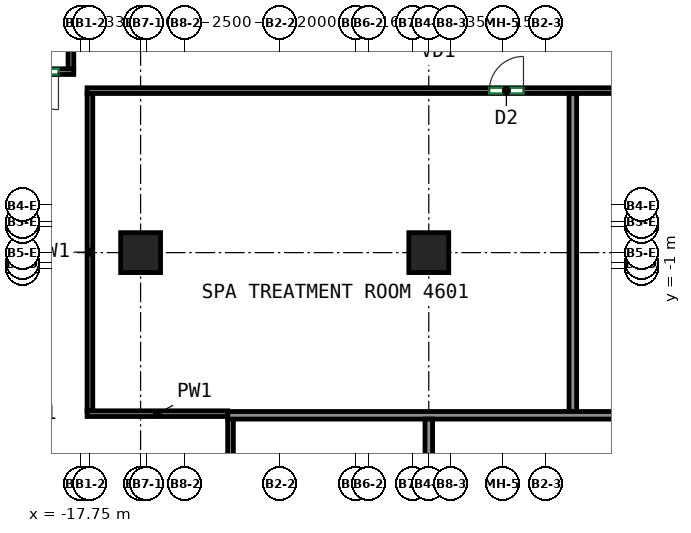
"""IFC4 building model, lengths in metres.
Left out: names, types, materials, properties, quantities, classifications, styles, units other than length and angle.
Written with IfcOpenShell. Run it as: python <this file> out.ifc"""

import sys

from ifc_helpers import new_model, si_unit, direction, frame, frame_2d, origin, origin_2d, place, context, subcontext, project, spatial, rectangle, extrude, source, transform, mapped, element, fill, save


model = new_model("IFC4")
c1 = context("Model", 3, precision=1e-05, world=origin(), true_north=direction((0.0, 1.0)))
c2 = subcontext(c1, "Body", "Model", "MODEL_VIEW")
j1 = project(units=[si_unit("LENGTHUNIT", "METRE"), si_unit("PLANEANGLEUNIT", "RADIAN")], contexts=[c1])
p1 = place(None, origin())
s1 = spatial("IfcSite", under=j1, at=p1, CompositionType="ELEMENT")
p2 = place(p1, origin())
s2 = spatial("IfcBuilding", under=s1, at=p2, CompositionType="ELEMENT")
p3 = place(p2, frame((0.0, 0.0, 192.3)))
s3 = spatial("IfcBuildingStorey", under=s2, at=p3, CompositionType="ELEMENT", Elevation=192.3)
m1 = source(origin(), c2, "Body", "SweptSolid", [
    extrude(rectangle(XDim=1.05, YDim=1.05, at=origin_2d()), origin(), (0.0, 0.0, 1.0), 3.0),
])
for number, where, z_axis, x_axis in (
    (1, (-16.167, -0.562, 0.0), (0.0, 0.0, 1.0), (1.0, 0.0, 0.0)),
    (2, (-8.583, -0.562, 0.0), (0.0, 0.0, 1.0), (1.0, 0.0, 0.0)),
):
    element("IfcColumn", number, at=place(p3, frame(where, z_axis=z_axis, x_axis=x_axis)), inside=s3, PredefinedType="COLUMN", context=c2, shape_type="MappedRepresentation", body=[
        mapped(m1, transform((0.0, 0.0, 0.0))),
    ])
p4 = place(p3, frame((-17.925, 4.2, 0.0), z_axis=(0.0, 0.0, 1.0), x_axis=(-1.0, 0.0, 0.0)))
e3 = element("IfcWall", 3, at=p4, inside=s3, PredefinedType="PARTITIONING", context=c2, shape_type="SweptSolid", body=[
    extrude(rectangle(XDim=2.109, YDim=0.15, at=frame_2d((1.054, 0.0))), origin(), (0.0, 0.0, 1.0), 3.0),
])
p5 = place(p4, frame((0.403, 0.0, 0.0)))
e4 = element("IfcOpeningElement", 4, at=p5, cuts=e3, PredefinedType="OPENING", context=c2, shape_type="SweptSolid", body=[
    extrude(rectangle(XDim=1.0, YDim=2.1, at=frame_2d((0.5, 1.05))), frame((0.0, 0.085, 0.0), z_axis=(0.0, -1.0, 0.0), x_axis=(1.0, 0.0, 0.0)), (0.0, 0.0, 1.0), 0.17),
])
p6 = place(p3, frame((-18.0, 4.275, 0.0), z_axis=(0.0, 0.0, 1.0), x_axis=(0.0, 1.0, 0.0)))
e5 = element("IfcWall", 5, at=p6, inside=s3, PredefinedType="PARTITIONING", context=c2, shape_type="SweptSolid", body=[
    extrude(rectangle(XDim=1.285, YDim=0.15, at=frame_2d((0.643, 0.0))), origin(), (0.0, 0.0, 1.0), 3.0),
])
p7 = place(p3, frame((-17.575, 3.7, 0.0), z_axis=(0.0, 0.0, 1.0), x_axis=(1.0, 0.0, 0.0)))
e6 = element("IfcWall", 6, at=p7, inside=s3, PredefinedType="PARTITIONING", context=c2, shape_type="SweptSolid", body=[
    extrude(rectangle(XDim=33.85, YDim=0.15, at=frame_2d((16.925, 0.0))), origin(), (0.0, 0.0, 1.0), 3.0),
])
p8 = place(p7, frame((10.584, 0.0, 0.0)))
e7 = element("IfcOpeningElement", 7, at=p8, cuts=e6, PredefinedType="OPENING", context=c2, shape_type="SweptSolid", body=[
    extrude(rectangle(XDim=0.9, YDim=2.1, at=frame_2d((0.45, 1.05))), frame((0.0, 0.085, 0.0), z_axis=(0.0, -1.0, 0.0), x_axis=(1.0, 0.0, 0.0)), (0.0, 0.0, 1.0), 0.17),
])
p9 = place(p7, frame((16.175, 0.0, 0.0)))
e8 = element("IfcOpeningElement", 8, at=p9, cuts=e6, PredefinedType="OPENING", context=c2, shape_type="SweptSolid", body=[
    extrude(rectangle(XDim=0.9, YDim=2.1, at=frame_2d((0.45, 1.05))), frame((0.0, 0.085, 0.0), z_axis=(0.0, -1.0, 0.0), x_axis=(1.0, 0.0, 0.0)), (0.0, 0.0, 1.0), 0.17),
])
p10 = place(p7, frame((25.696, 0.0, 0.0)))
e9 = element("IfcOpeningElement", 9, at=p10, cuts=e6, PredefinedType="OPENING", context=c2, shape_type="SweptSolid", body=[
    extrude(rectangle(XDim=0.9, YDim=2.1, at=frame_2d((0.45, 1.05))), frame((0.0, 0.085, 0.0), z_axis=(0.0, -1.0, 0.0), x_axis=(1.0, 0.0, 0.0)), (0.0, 0.0, 1.0), 0.17),
])
p11 = place(p3, frame((-17.5, -4.725, 0.0), z_axis=(0.0, 0.0, 1.0), x_axis=(0.0, 1.0, 0.0)))
e10 = element("IfcWall", 10, at=p11, inside=s3, PredefinedType="PARTITIONING", context=c2, shape_type="SweptSolid", body=[
    extrude(rectangle(XDim=8.35, YDim=0.15, at=frame_2d((4.175, 0.0))), origin(), (0.0, 0.0, 1.0), 3.0),
])
p12 = place(p3, frame((-17.575, -4.8, 0.0), z_axis=(0.0, 0.0, 1.0), x_axis=(1.0, 0.0, 0.0)))
e11 = element("IfcWall", 11, at=p12, inside=s3, PredefinedType="PARTITIONING", context=c2, shape_type="SweptSolid", body=[
    extrude(rectangle(XDim=3.702, YDim=0.15, at=frame_2d((1.851, 0.0))), origin(), (0.0, 0.0, 1.0), 3.0),
])
p13 = place(p3, frame((-13.8, -7.75, 0.0), z_axis=(0.0, 0.0, 1.0), x_axis=(0.0, 1.0, 0.0)))
e12 = element("IfcWall", 12, at=p13, inside=s3, PredefinedType="PARTITIONING", context=c2, shape_type="SweptSolid", body=[
    extrude(rectangle(XDim=2.817, YDim=0.15, at=frame_2d((1.408, 0.0))), origin(), (0.0, 0.0, 1.0), 3.0),
])
p14 = place(p3, frame((-4.792, -4.743, 0.0), z_axis=(0.0, 0.0, 1.0), x_axis=(0.0, 1.0, 0.0)))
e13 = element("IfcWall", 13, at=p14, inside=s3, PredefinedType="PARTITIONING", context=c2, shape_type="SweptSolid", body=[
    extrude(rectangle(XDim=8.366, YDim=0.2, at=frame_2d((4.183, 0.0))), origin(), (0.0, 0.0, 1.0), 3.0),
])
p15 = place(p3, frame((-13.873, -4.843, 0.0), z_axis=(0.0, 0.0, 1.0), x_axis=(1.0, 0.0, 0.0)))
e14 = element("IfcWall", 14, at=p15, inside=s3, PredefinedType="PARTITIONING", context=c2, shape_type="SweptSolid", body=[
    extrude(rectangle(XDim=30.146, YDim=0.2, at=frame_2d((15.073, 0.0))), origin(), (0.0, 0.0, 1.0), 3.0),
])
p16 = place(p3, frame((-8.583, -8.6, 0.0), z_axis=(0.0, 0.0, 1.0), x_axis=(0.0, 1.0, 0.0)))
e15 = element("IfcWall", 15, at=p16, inside=s3, PredefinedType="PARTITIONING", context=c2, shape_type="SweptSolid", body=[
    extrude(rectangle(XDim=3.657, YDim=0.2, at=frame_2d((1.829, 0.0))), origin(), (0.0, 0.0, 1.0), 2.4),
])
p17 = place(p8, origin())
e16 = element("IfcDoor", 16, at=p17, inside=s3, OperationType="SINGLE_SWING_RIGHT", PredefinedType="DOOR", context=c2, shape_type="SweptSolid", body=[
    extrude(rectangle(XDim=0.9, YDim=2.1, at=frame_2d((0.45, 1.05))), frame((0.0, 0.025, 0.0), z_axis=(0.0, -1.0, 0.0), x_axis=(1.0, 0.0, 0.0)), (0.0, 0.0, 1.0), 0.05),
])
fill(e7, e16)
p18 = place(p5, origin())
e17 = element("IfcDoor", 17, at=p18, inside=s3, OperationType="SINGLE_SWING_LEFT", PredefinedType="DOOR", context=c2, shape_type="SweptSolid", body=[
    extrude(rectangle(XDim=1.0, YDim=2.1, at=frame_2d((0.5, 1.05))), frame((0.0, 0.025, 0.0), z_axis=(0.0, -1.0, 0.0), x_axis=(1.0, 0.0, 0.0)), (0.0, 0.0, 1.0), 0.05),
])
fill(e4, e17)
save(model, sys.argv[1])
